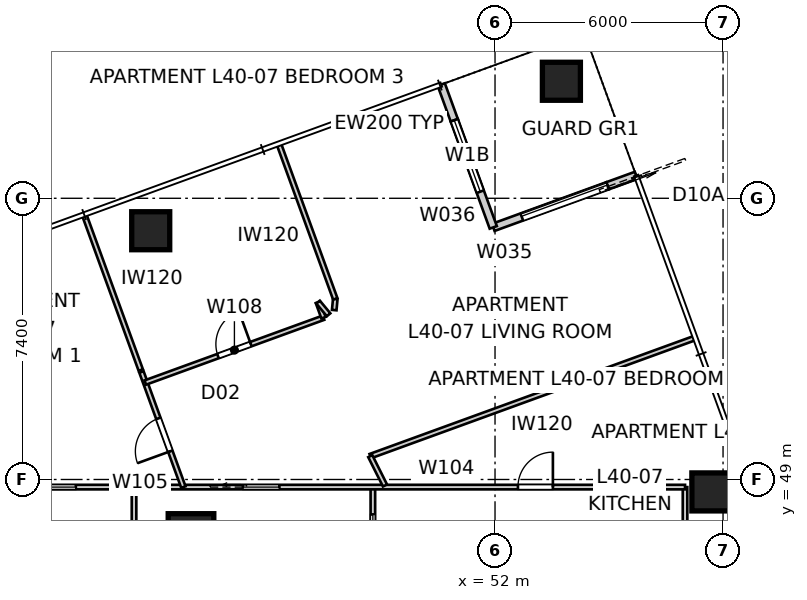
"""IFC4 building model, lengths in metres.
Left out: names, types, materials, properties, quantities, classifications, styles, units other than length and angle.
Written with IfcOpenShell. Run it as: python <this file> out.ifc"""

import sys

from ifc_helpers import new_model, si_unit, direction, frame, frame_2d, origin, origin_2d, place, context, subcontext, project, spatial, rectangle, extrude, element, fill, save


model = new_model("IFC4")
c1 = context("Model", 3, precision=1e-05, world=origin(), true_north=direction((0.0, 1.0)))
c2 = subcontext(c1, "Body", "Model", "MODEL_VIEW")
j1 = project(units=[si_unit("LENGTHUNIT", "METRE"), si_unit("PLANEANGLEUNIT", "RADIAN")], contexts=[c1])
p1 = place(None, origin())
s1 = spatial("IfcSite", under=j1, at=p1, CompositionType="ELEMENT")
p2 = place(p1, origin())
s2 = spatial("IfcBuilding", under=s1, at=p2, CompositionType="ELEMENT")
p3 = place(p2, frame((0.0, 0.0, 147.2)))
s3 = spatial("IfcBuildingStorey", under=s2, at=p3, CompositionType="ELEMENT", Elevation=147.2)
for number, where, z_axis, x_axis in (
    (1, (57.68, 48.673, 0.0), (0.0, 0.0, 1.0), (1.0, 0.0, 0.0)),
    (2, (53.747, 59.479, 0.0), (0.0, 0.0, 1.0), (1.0, 0.0, 0.0)),
    (3, (42.94, 55.546, 0.0), (0.0, 0.0, 1.0), (1.0, 0.0, 0.0)),
):
    element("IfcColumn", number, at=place(p3, frame(where, z_axis=z_axis, x_axis=x_axis)), inside=s3, PredefinedType="COLUMN", context=c2, shape_type="SweptSolid", body=[
        extrude(rectangle(XDim=1.0, YDim=1.0, at=origin_2d()), origin(), (0.0, 0.0, 1.0), 3.4),
    ])
p4 = place(p3, frame((44.0, 47.5, 0.0), z_axis=(0.0, 0.0, 1.0), x_axis=(1.0, 0.0, 0.0)))
e4 = element("IfcColumn", 4, at=p4, inside=s3, PredefinedType="COLUMN", context=c2, shape_type="SweptSolid", body=[
    extrude(rectangle(XDim=1.2, YDim=1.2, at=origin_2d()), origin(), (0.0, 0.0, 1.0), 3.4),
])
p5 = place(p3, frame((55.712, 57.002, 0.0), z_axis=(0.0, 0.0, 1.0), x_axis=(-0.939659694648, -0.342110593602, 0.0)))
e5 = element("IfcWall", 5, at=p5, inside=s3, PredefinedType="SOLIDWALL", context=c2, shape_type="SweptSolid", body=[
    extrude(rectangle(XDim=0.8, YDim=0.2, at=frame_2d((0.4, 0.0))), origin(), (0.0, 0.0, 1.0), 3.25),
])
p6 = place(p3, frame((54.96, 56.729, 0.0), z_axis=(0.0, 0.0, 1.0), x_axis=(-0.939693144909, -0.342018703306, 0.0)))
e6 = element("IfcWall", 6, at=p6, inside=s3, PredefinedType="SOLIDWALL", context=c2, shape_type="SweptSolid", body=[
    extrude(rectangle(XDim=3.2, YDim=0.2, at=frame_2d((1.6, 0.0))), origin(), (0.0, 0.0, 1.0), 2.722),
])
p7 = place(p6, origin())
e7 = element("IfcOpeningElement", 7, at=p7, cuts=e6, PredefinedType="OPENING", context=c2, shape_type="SweptSolid", body=[
    extrude(rectangle(XDim=2.4, YDim=2.1, at=frame_2d((1.2, 1.05))), frame((0.0, 0.11, 0.0), z_axis=(0.0, -1.0, 0.0), x_axis=(1.0, 0.0, 0.0)), (0.0, 0.0, 1.0), 0.22),
])
p8 = place(p3, frame((51.953, 55.634, 0.0), z_axis=(0.0, 0.0, 1.0), x_axis=(-0.341965219194, 0.939712609717, 0.0)))
e8 = element("IfcWall", 8, at=p8, inside=s3, PredefinedType="SOLIDWALL", context=c2, shape_type="SweptSolid", body=[
    extrude(rectangle(XDim=3.0, YDim=0.2, at=frame_2d((1.5, 0.0))), origin(), (0.0, 0.0, 1.0), 2.722),
])
p9 = place(p8, frame((1.0, 0.0, 0.45)))
e9 = element("IfcOpeningElement", 9, at=p9, cuts=e8, PredefinedType="OPENING", context=c2, shape_type="SweptSolid", body=[
    extrude(rectangle(XDim=2.0, YDim=1.8, at=frame_2d((1.0, 0.9))), frame((0.0, 0.11, 0.0), z_axis=(0.0, -1.0, 0.0), x_axis=(1.0, 0.0, 0.0)), (0.0, 0.0, 1.0), 0.22),
])
p10 = place(p3, frame((50.927, 58.453, 0.0), z_axis=(0.0, 0.0, 1.0), x_axis=(-0.342037080957, 0.939686455819, 0.0)))
e10 = element("IfcWall", 10, at=p10, inside=s3, PredefinedType="SOLIDWALL", context=c2, shape_type="SweptSolid", body=[
    extrude(rectangle(XDim=1.0, YDim=0.2, at=frame_2d((0.5, 0.0))), origin(), (0.0, 0.0, 1.0), 3.25),
])
p11 = place(p3, frame((57.0, 48.8, 0.0), z_axis=(0.0, 0.0, 1.0), x_axis=(0.0, -1.0, 0.0)))
e11 = element("IfcWall", 11, at=p11, inside=s3, PredefinedType="PARTITIONING", context=c2, shape_type="SweptSolid", body=[
    extrude(rectangle(XDim=38.113, YDim=0.12, at=frame_2d((19.056, 0.0))), origin(), (0.0, 0.0, 1.0), 2.55),
])
p12 = place(p11, frame((4.198, 0.0, 0.0)))
e12 = element("IfcOpeningElement", 12, at=p12, cuts=e11, PredefinedType="OPENING", context=c2, shape_type="SweptSolid", body=[
    extrude(rectangle(XDim=0.92, YDim=2.34, at=frame_2d((0.46, 1.17))), frame((0.0, 0.07, 0.0), z_axis=(0.0, -1.0, 0.0), x_axis=(1.0, 0.0, 0.0)), (0.0, 0.0, 1.0), 0.14),
])
p13 = place(p11, frame((7.692, 0.0, 0.0)))
e13 = element("IfcOpeningElement", 13, at=p13, cuts=e11, PredefinedType="OPENING", context=c2, shape_type="SweptSolid", body=[
    extrude(rectangle(XDim=0.92, YDim=2.34, at=frame_2d((0.46, 1.17))), frame((0.0, 0.07, 0.0), z_axis=(0.0, -1.0, 0.0), x_axis=(1.0, 0.0, 0.0)), (0.0, 0.0, 1.0), 0.14),
])
p14 = place(p11, frame((20.162, 0.0, 0.0)))
e14 = element("IfcOpeningElement", 14, at=p14, cuts=e11, PredefinedType="OPENING", context=c2, shape_type="SweptSolid", body=[
    extrude(rectangle(XDim=0.92, YDim=2.34, at=frame_2d((0.46, 1.17))), frame((0.0, 0.07, 0.0), z_axis=(0.0, -1.0, 0.0), x_axis=(1.0, 0.0, 0.0)), (0.0, 0.0, 1.0), 0.14),
])
p15 = place(p11, frame((34.056, 0.0, 0.0)))
e15 = element("IfcOpeningElement", 15, at=p15, cuts=e11, PredefinedType="OPENING", context=c2, shape_type="SweptSolid", body=[
    extrude(rectangle(XDim=0.92, YDim=2.34, at=frame_2d((0.46, 1.17))), frame((0.0, 0.07, 0.0), z_axis=(0.0, -1.0, 0.0), x_axis=(1.0, 0.0, 0.0)), (0.0, 0.0, 1.0), 0.14),
])
p16 = place(p11, frame((24.482, 0.0, 0.0)))
e16 = element("IfcOpeningElement", 16, at=p16, cuts=e11, PredefinedType="OPENING", context=c2, shape_type="SweptSolid", body=[
    extrude(rectangle(XDim=0.96, YDim=2.1, at=frame_2d((0.48, 1.05))), frame((0.0, 0.07, 0.0), z_axis=(0.0, -1.0, 0.0), x_axis=(1.0, 0.0, 0.0)), (0.0, 0.0, 1.0), 0.14),
])
p17 = place(p3, frame((48.786, 46.4, 0.0), z_axis=(0.0, 0.0, 1.0), x_axis=(0.0, 1.0, 0.0)))
e17 = element("IfcWall", 17, at=p17, inside=s3, PredefinedType="PARTITIONING", context=c2, shape_type="SweptSolid", body=[
    extrude(rectangle(XDim=2.4, YDim=0.12, at=frame_2d((1.2, 0.0))), origin(), (0.0, 0.0, 1.0), 3.25),
])
p18 = place(p17, frame((0.72, 0.0, 0.0)))
e18 = element("IfcOpeningElement", 18, at=p18, cuts=e17, PredefinedType="OPENING", context=c2, shape_type="SweptSolid", body=[
    extrude(rectangle(XDim=0.96, YDim=2.1, at=frame_2d((0.48, 1.05))), frame((0.0, 0.07, 0.0), z_axis=(0.0, -1.0, 0.0), x_axis=(1.0, 0.0, 0.0)), (0.0, 0.0, 1.0), 0.14),
])
p19 = place(p3, frame((42.501, 46.4, 0.0), z_axis=(0.0, 0.0, 1.0), x_axis=(0.0, 1.0, 0.0)))
e19 = element("IfcWall", 19, at=p19, inside=s3, PredefinedType="PARTITIONING", context=c2, shape_type="SweptSolid", body=[
    extrude(rectangle(XDim=2.4, YDim=0.12, at=frame_2d((1.2, 0.0))), origin(), (0.0, 0.0, 1.0), 3.25),
])
p20 = place(p3, frame((37.2, 48.8, 0.0), z_axis=(0.0, 0.0, 1.0), x_axis=(1.0, 0.0, 0.0)))
e20 = element("IfcWall", 20, at=p20, inside=s3, PredefinedType="PARTITIONING", context=c2, shape_type="SweptSolid", body=[
    extrude(rectangle(XDim=19.8, YDim=0.12, at=frame_2d((9.9, 0.0))), origin(), (0.0, 0.0, 1.0), 3.25),
])
p21 = place(p20, frame((15.403, 0.0, 0.0)))
e21 = element("IfcOpeningElement", 21, at=p21, cuts=e20, PredefinedType="OPENING", context=c2, shape_type="SweptSolid", body=[
    extrude(rectangle(XDim=0.92, YDim=2.34, at=frame_2d((0.46, 1.17))), frame((0.0, 0.07, 0.0), z_axis=(0.0, -1.0, 0.0), x_axis=(1.0, 0.0, 0.0)), (0.0, 0.0, 1.0), 0.14),
])
p22 = place(p20, frame((8.165, 0.0, 0.0)))
e22 = element("IfcOpeningElement", 22, at=p22, cuts=e20, PredefinedType="OPENING", context=c2, shape_type="SweptSolid", body=[
    extrude(rectangle(XDim=0.96, YDim=2.1, at=frame_2d((0.48, 1.05))), frame((0.0, 0.07, 0.0), z_axis=(0.0, -1.0, 0.0), x_axis=(1.0, 0.0, 0.0)), (0.0, 0.0, 1.0), 0.14),
])
p23 = place(p20, frame((2.81, 0.0, 0.0)))
e23 = element("IfcOpeningElement", 23, at=p23, cuts=e20, PredefinedType="OPENING", context=c2, shape_type="SweptSolid", body=[
    extrude(rectangle(XDim=0.96, YDim=2.1, at=frame_2d((0.48, 1.05))), frame((0.0, 0.07, 0.0), z_axis=(0.0, -1.0, 0.0), x_axis=(1.0, 0.0, 0.0)), (0.0, 0.0, 1.0), 0.14),
])
p24 = place(p3, frame((43.799, 48.8, 0.0), z_axis=(0.0, 0.0, 1.0), x_axis=(-0.342034943783, 0.939687233728, 0.0)))
e24 = element("IfcWall", 24, at=p24, inside=s3, PredefinedType="PARTITIONING", context=c2, shape_type="SweptSolid", body=[
    extrude(rectangle(XDim=3.223, YDim=0.12, at=frame_2d((1.612, 0.0))), origin(), (0.0, 0.0, 1.0), 3.25),
])
p25 = place(p24, frame((1.004, 0.0, 0.0)))
e25 = element("IfcOpeningElement", 25, at=p25, cuts=e24, PredefinedType="OPENING", context=c2, shape_type="SweptSolid", body=[
    extrude(rectangle(XDim=0.92, YDim=2.34, at=frame_2d((0.46, 1.17))), frame((0.0, 0.07, 0.0), z_axis=(0.0, -1.0, 0.0), x_axis=(1.0, 0.0, 0.0)), (0.0, 0.0, 1.0), 0.14),
])
p26 = place(p3, frame((57.231, 52.713, 0.0), z_axis=(0.0, 0.0, 1.0), x_axis=(-0.939692673089, -0.342019999623, 0.0)))
e26 = element("IfcWall", 26, at=p26, inside=s3, PredefinedType="PARTITIONING", context=c2, shape_type="SweptSolid", body=[
    extrude(rectangle(XDim=9.06, YDim=0.12, at=frame_2d((4.53, 0.0))), origin(), (0.0, 0.0, 1.0), 3.25),
])
p27 = place(p3, frame((48.717, 49.615, 0.0), z_axis=(0.0, 0.0, 1.0), x_axis=(0.448117513314, -0.893974660861, 0.0)))
e27 = element("IfcWall", 27, at=p27, inside=s3, PredefinedType="PARTITIONING", context=c2, shape_type="SweptSolid", body=[
    extrude(rectangle(XDim=0.864, YDim=0.12, at=frame_2d((0.432, 0.0))), origin(), (0.0, 0.0, 1.0), 3.25),
])
p28 = place(p3, frame((42.798, 51.551, 0.0), z_axis=(0.0, 0.0, 1.0), x_axis=(0.939699104319, 0.342002329438, 0.0)))
e28 = element("IfcWall", 28, at=p28, inside=s3, PredefinedType="PARTITIONING", context=c2, shape_type="SweptSolid", body=[
    extrude(rectangle(XDim=4.99, YDim=0.12, at=frame_2d((2.495, 0.0))), origin(), (0.0, 0.0, 1.0), 3.25),
])
p29 = place(p28, frame((2.035, 0.0, 0.0)))
e29 = element("IfcOpeningElement", 29, at=p29, cuts=e28, PredefinedType="OPENING", context=c2, shape_type="SweptSolid", body=[
    extrude(rectangle(XDim=0.92, YDim=2.34, at=frame_2d((0.46, 1.17))), frame((0.0, 0.07, 0.0), z_axis=(0.0, -1.0, 0.0), x_axis=(1.0, 0.0, 0.0)), (0.0, 0.0, 1.0), 0.14),
])
for number, where, z_axis, x_axis in (
    (30, (47.487, 53.258, 0.0), (0.0, 0.0, 1.0), (-0.342, 0.94, 0.0)),
    (31, (47.344, 53.667, 0.0), (0.0, 0.0, 1.0), (0.639, -0.77, 0.0)),
):
    element("IfcWall", number, at=place(p3, frame(where, z_axis=z_axis, x_axis=x_axis)), inside=s3, PredefinedType="PARTITIONING", context=c2, shape_type="SweptSolid", body=[
        extrude(rectangle(XDim=0.433, YDim=0.12, at=frame_2d((0.216, 0.0))), origin(), (0.0, 0.0, 1.0), 3.25),
    ])
p30 = place(p3, frame((47.769, 53.458, 0.0), z_axis=(0.0, 0.0, 1.0), x_axis=(0.093212941297, 0.995646195983, 0.0)))
e32 = element("IfcWall", 32, at=p30, inside=s3, PredefinedType="PARTITIONING", context=c2, shape_type="SweptSolid", body=[
    extrude(rectangle(XDim=0.296, YDim=0.12, at=frame_2d((0.148, 0.0))), origin(), (0.0, 0.0, 1.0), 3.25),
])
p31 = place(p3, frame((47.796, 53.752, 0.0), z_axis=(0.0, 0.0, 1.0), x_axis=(-0.342011603146, 0.939695729113, 0.0)))
e33 = element("IfcWall", 33, at=p31, inside=s3, PredefinedType="PARTITIONING", context=c2, shape_type="SweptSolid", body=[
    extrude(rectangle(XDim=4.307, YDim=0.12, at=frame_2d((2.153, 0.0))), origin(), (0.0, 0.0, 1.0), 3.25),
])
p32 = place(p3, frame((41.202, 55.935, 0.0), z_axis=(0.0, 0.0, 1.0), x_axis=(0.341992887332, -0.939702540709, 0.0)))
e34 = element("IfcWall", 34, at=p32, inside=s3, PredefinedType="PARTITIONING", context=c2, shape_type="SweptSolid", body=[
    extrude(rectangle(XDim=4.315, YDim=0.12, at=frame_2d((2.158, 0.0))), origin(), (0.0, 0.0, 1.0), 3.25),
])
p33 = place(p7, origin())
e35 = element("IfcDoor", 35, at=p33, inside=s3, OperationType="SLIDING_TO_LEFT", PredefinedType="DOOR", context=c2, shape_type="SweptSolid", body=[
    extrude(rectangle(XDim=2.4, YDim=2.1, at=frame_2d((1.2, 1.05))), frame((0.0, 0.025, 0.0), z_axis=(0.0, -1.0, 0.0), x_axis=(1.0, 0.0, 0.0)), (0.0, 0.0, 1.0), 0.05),
])
fill(e7, e35)
p34 = place(p9, origin())
e36 = element("IfcWindow", 36, at=p34, inside=s3, PartitioningType="SINGLE_PANEL", PredefinedType="WINDOW", context=c2, shape_type="SweptSolid", body=[
    extrude(rectangle(XDim=2.0, YDim=1.8, at=frame_2d((1.0, 0.9))), frame((0.0, 0.03, 0.0), z_axis=(0.0, -1.0, 0.0), x_axis=(1.0, 0.0, 0.0)), (0.0, 0.0, 1.0), 0.06),
])
fill(e9, e36)
p35 = place(p21, origin())
e37 = element("IfcDoor", 37, at=p35, inside=s3, OperationType="SINGLE_SWING_RIGHT", PredefinedType="DOOR", context=c2, shape_type="SweptSolid", body=[
    extrude(rectangle(XDim=0.92, YDim=2.34, at=frame_2d((0.46, 1.17))), frame((0.0, 0.025, 0.0), z_axis=(0.0, -1.0, 0.0), x_axis=(1.0, 0.0, 0.0)), (0.0, 0.0, 1.0), 0.05),
])
fill(e21, e37)
p36 = place(p18, origin())
e38 = element("IfcDoor", 38, at=p36, inside=s3, OperationType="SLIDING_TO_LEFT", PredefinedType="DOOR", context=c2, shape_type="SweptSolid", body=[
    extrude(rectangle(XDim=0.96, YDim=2.1, at=frame_2d((0.48, 1.05))), frame((0.0, 0.025, 0.0), z_axis=(0.0, -1.0, 0.0), x_axis=(1.0, 0.0, 0.0)), (0.0, 0.0, 1.0), 0.05),
])
fill(e18, e38)
p37 = place(p22, origin())
e39 = element("IfcDoor", 39, at=p37, inside=s3, OperationType="SLIDING_TO_LEFT", PredefinedType="DOOR", context=c2, shape_type="SweptSolid", body=[
    extrude(rectangle(XDim=0.96, YDim=2.1, at=frame_2d((0.48, 1.05))), frame((0.0, 0.025, 0.0), z_axis=(0.0, -1.0, 0.0), x_axis=(1.0, 0.0, 0.0)), (0.0, 0.0, 1.0), 0.05),
])
fill(e22, e39)
p38 = place(p29, origin())
e40 = element("IfcDoor", 40, at=p38, inside=s3, OperationType="SINGLE_SWING_RIGHT", PredefinedType="DOOR", context=c2, shape_type="SweptSolid", body=[
    extrude(rectangle(XDim=0.92, YDim=2.34, at=frame_2d((0.46, 1.17))), frame((0.0, 0.025, 0.0), z_axis=(0.0, -1.0, 0.0), x_axis=(1.0, 0.0, 0.0)), (0.0, 0.0, 1.0), 0.05),
])
fill(e29, e40)
p39 = place(p25, origin())
e41 = element("IfcDoor", 41, at=p39, inside=s3, OperationType="SINGLE_SWING_LEFT", PredefinedType="DOOR", context=c2, shape_type="SweptSolid", body=[
    extrude(rectangle(XDim=0.92, YDim=2.34, at=frame_2d((0.46, 1.17))), frame((0.0, 0.025, 0.0), z_axis=(0.0, -1.0, 0.0), x_axis=(1.0, 0.0, 0.0)), (0.0, 0.0, 1.0), 0.05),
])
fill(e25, e41)
p40 = place(p23, origin())
e42 = element("IfcDoor", 42, at=p40, inside=s3, OperationType="SLIDING_TO_LEFT", PredefinedType="DOOR", context=c2, shape_type="SweptSolid", body=[
    extrude(rectangle(XDim=0.96, YDim=2.1, at=frame_2d((0.48, 1.05))), frame((0.0, 0.025, 0.0), z_axis=(0.0, -1.0, 0.0), x_axis=(1.0, 0.0, 0.0)), (0.0, 0.0, 1.0), 0.05),
])
fill(e23, e42)
save(model, sys.argv[1])
